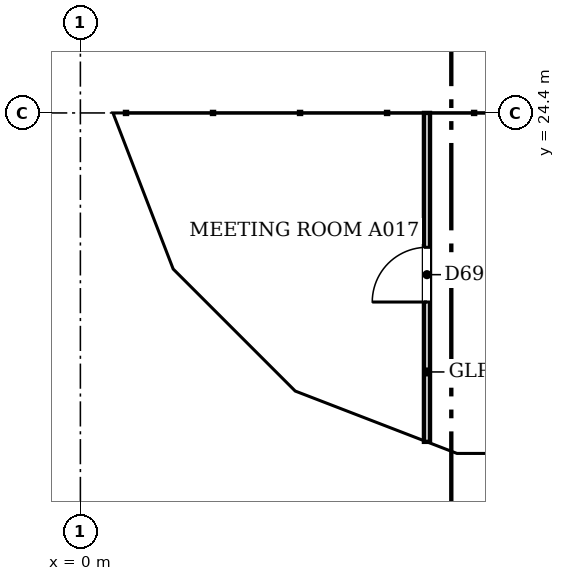
"""IFC4 building model, lengths in metres.
Left out: names, types, materials, properties, quantities, classifications, styles, units other than length and angle.
Written with IfcOpenShell. Run it as: python <this file> out.ifc"""

import sys

from ifc_helpers import new_model, si_unit, direction, frame, frame_2d, origin, place, context, subcontext, project, spatial, polyline, rectangle, outline, extrude, faceted_brep, source, transform, mapped, element, fill, save


model = new_model("IFC4")
c1 = context("Model", 3, precision=1e-05, world=origin(), true_north=direction((0.0, 1.0)))
c2 = subcontext(c1, "Body", "Model", "MODEL_VIEW")
j1 = project(units=[si_unit("LENGTHUNIT", "METRE"), si_unit("PLANEANGLEUNIT", "RADIAN")], contexts=[c1])
p1 = place(None, origin())
s1 = spatial("IfcSite", under=j1, at=p1, CompositionType="ELEMENT")
p2 = place(p1, origin())
s2 = spatial("IfcBuilding", under=s1, at=p2, CompositionType="ELEMENT")
p3 = place(p2, frame((0.0, 0.0, 135.4)))
s3 = spatial("IfcBuildingStorey", under=s2, at=p3, CompositionType="ELEMENT", Elevation=135.4)
m1 = source(origin(), c2, "Body", "Brep", [
    faceted_brep([(3.05, -0.25, 0.0), (6.053, -0.25, 3.8), (3.05, -0.25, 7.6), (0.0, -0.25, 3.8), (0.0, 0.25, 3.8), (3.05, 0.25, 7.6), (6.007, 0.25, 3.859), (6.007, 0.25, 3.741), (3.05, 0.25, 0.0), (6.053, 0.0, 3.8)], [[[0, 1, 2, 3]], [[4, 5, 6, 7, 8]], [[8, 7, 9, 1, 0]], [[6, 5, 2, 1, 9]], [[5, 4, 3, 2]], [[4, 8, 0, 3]], [[9, 7, 6]]]),
])
p4 = place(p3, frame((0.25, 30.5, -3.8), z_axis=(0.0, 0.0, 1.0), x_axis=(0.0, -1.0, 0.0)))
e1 = element("IfcWall", 1, at=p4, inside=s3, PredefinedType="SOLIDWALL", context=c2, shape_type="MappedRepresentation", body=[
    mapped(m1, transform((0.0, 0.0, 0.0), scale=1.0)),
])
m2 = source(origin(), c2, "Body", "SweptSolid", [
    extrude(outline(polyline([(3.049, 0.401), (5.735, 3.8), (3.049, 7.199), (0.321, 3.8), (3.049, 0.401)])), frame((0.0, 0.26, 0.0), z_axis=(0.0, -1.0, 0.0), x_axis=(1.0, 0.0, 0.0)), (0.0, 0.0, 1.0), 0.52),
])
p5 = place(p4, origin())
e2 = element("IfcOpeningElement", 2, at=p5, cuts=e1, PredefinedType="OPENING", context=c2, shape_type="MappedRepresentation", body=[
    mapped(m2, transform((0.0, 0.0, 0.0), scale=1.0)),
])
m3 = source(origin(), c2, "Body", "Brep", [
    faceted_brep([(2.95, -0.25, 0.0), (3.003, -0.25, 0.068), (3.003, -0.25, 7.531), (2.95, -0.25, 7.6), (0.0, -0.25, 3.8), (0.047, 0.25, 3.86), (2.898, 0.25, 7.532), (2.898, 0.25, 0.068), (0.047, 0.25, 3.74), (2.95, 0.0, 0.0), (2.95, 0.0, 7.6), (0.0, 0.0, 3.8)], [[[0, 1, 2, 3, 4]], [[5, 6, 7, 8]], [[1, 0, 9]], [[10, 3, 2]], [[6, 5, 11, 4, 3, 10]], [[8, 7, 9, 0, 4, 11]], [[8, 11, 5]], [[1, 9, 7, 6, 10, 2]]]),
])
p6 = place(p3, frame((0.25, 24.447, -3.8), z_axis=(0.0, 0.0, 1.0), x_axis=(0.35992665181, -0.932980602862, 0.0)))
e3 = element("IfcWall", 3, at=p6, inside=s3, PredefinedType="SOLIDWALL", context=c2, shape_type="MappedRepresentation", body=[
    mapped(m3, transform((0.0, 0.0, 0.0), scale=1.0)),
])
m4 = source(origin(), c2, "Body", "SweptSolid", [
    extrude(outline(polyline([(2.75, 6.935), (0.316, 3.8), (2.75, 0.665), (2.75, 6.935)])), frame((0.0, 0.26, 0.0), z_axis=(0.0, -1.0, 0.0), x_axis=(1.0, 0.0, 0.0)), (0.0, 0.0, 1.0), 0.52),
])
p7 = place(p6, origin())
e4 = element("IfcOpeningElement", 4, at=p7, cuts=e3, PredefinedType="OPENING", context=c2, shape_type="MappedRepresentation", body=[
    mapped(m4, transform((0.0, 0.0, 0.0), scale=1.0)),
])
m5 = source(origin(), c2, "Body", "Brep", [
    faceted_brep([(0.053, -0.25, 0.0), (2.997, -0.25, 3.8), (0.053, -0.25, 7.6), (0.0, -0.25, 7.532), (0.0, -0.25, 0.068), (0.106, 0.25, 7.531), (2.944, 0.25, 3.868), (2.944, 0.25, 3.732), (0.106, 0.25, 0.068), (2.997, 0.0, 3.8), (0.053, 0.0, 0.0), (0.053, 0.0, 7.6)], [[[0, 1, 2, 3, 4]], [[5, 6, 7, 8]], [[8, 7, 9, 1, 0, 10]], [[6, 5, 11, 2, 1, 9]], [[3, 2, 11]], [[10, 0, 4]], [[8, 10, 4, 3, 11, 5]], [[9, 7, 6]]]),
])
p8 = place(p3, frame((1.274, 21.731, -3.8), z_axis=(0.0, 0.0, 1.0), x_axis=(0.707147509625, -0.707066050402, 0.0)))
e5 = element("IfcWall", 5, at=p8, inside=s3, PredefinedType="SOLIDWALL", context=c2, shape_type="MappedRepresentation", body=[
    mapped(m5, transform((0.0, 0.0, 0.0), scale=1.0)),
])
m6 = source(origin(), c2, "Body", "SweptSolid", [
    extrude(outline(polyline([(0.253, 0.666), (2.681, 3.8), (0.253, 6.934), (0.253, 0.666)])), frame((0.0, 0.26, 0.0), z_axis=(0.0, -1.0, 0.0), x_axis=(1.0, 0.0, 0.0)), (0.0, 0.0, 1.0), 0.52),
])
p9 = place(p8, origin())
e6 = element("IfcOpeningElement", 6, at=p9, cuts=e5, PredefinedType="OPENING", context=c2, shape_type="MappedRepresentation", body=[
    mapped(m6, transform((0.0, 0.0, 0.0), scale=1.0)),
])
m7 = source(origin(), c2, "Body", "Brep", [
    faceted_brep([(2.95, -0.25, 0.0), (2.997, -0.25, 0.059), (2.997, -0.25, 7.541), (2.95, -0.25, 7.6), (0.0, -0.25, 3.8), (0.053, 0.25, 3.868), (2.904, 0.25, 7.54), (2.904, 0.25, 0.06), (0.053, 0.25, 3.732), (2.95, 0.0, 0.0), (2.95, 0.0, 7.6), (0.0, 0.0, 3.8)], [[[0, 1, 2, 3, 4]], [[5, 6, 7, 8]], [[1, 0, 9]], [[10, 3, 2]], [[6, 5, 11, 4, 3, 10]], [[8, 7, 9, 0, 4, 11]], [[8, 11, 5]], [[1, 9, 7, 6, 10, 2]]]),
])
p10 = place(p3, frame((3.394, 19.612, -3.8), z_axis=(0.0, 0.0, 1.0), x_axis=(0.932990326376, -0.359901446078, 0.0)))
e7 = element("IfcWall", 7, at=p10, inside=s3, PredefinedType="SOLIDWALL", context=c2, shape_type="MappedRepresentation", body=[
    mapped(m7, transform((0.0, 0.0, 0.0), scale=1.0)),
])
p11 = place(p10, origin())
e8 = element("IfcOpeningElement", 8, at=p11, cuts=e7, PredefinedType="OPENING", context=c2, shape_type="MappedRepresentation", body=[
    mapped(m4, transform((0.0, 0.0, 0.0), scale=1.0)),
])
m8 = source(origin(), c2, "Body", "Brep", [
    faceted_brep([(0.047, -0.25, 0.0), (3.05, -0.25, 3.8), (0.047, -0.25, 7.6), (0.0, -0.25, 7.54), (0.0, -0.25, 0.06), (0.093, 0.25, 7.541), (3.05, 0.25, 3.8), (0.093, 0.25, 0.059), (0.047, 0.0, 0.0), (0.047, 0.0, 7.6)], [[[0, 1, 2, 3, 4]], [[5, 6, 7]], [[7, 6, 1, 0, 8]], [[6, 5, 9, 2, 1]], [[3, 2, 9]], [[8, 0, 4]], [[7, 8, 4, 3, 9, 5]]]),
])
p12 = place(p3, frame((6.1, 18.55, -3.8), z_axis=(0.0, 0.0, 1.0), x_axis=(1.0, 0.0, 0.0)))
e9 = element("IfcWall", 9, at=p12, inside=s3, PredefinedType="SOLIDWALL", context=c2, shape_type="MappedRepresentation", body=[
    mapped(m8, transform((0.0, 0.0, 0.0), scale=1.0)),
])
m9 = source(origin(), c2, "Body", "SweptSolid", [
    extrude(outline(polyline([(0.247, 0.656), (2.731, 3.8), (0.247, 6.944), (0.247, 0.656)])), frame((0.0, 0.26, 0.0), z_axis=(0.0, -1.0, 0.0), x_axis=(1.0, 0.0, 0.0)), (0.0, 0.0, 1.0), 0.52),
])
p13 = place(p12, origin())
e10 = element("IfcOpeningElement", 10, at=p13, cuts=e9, PredefinedType="OPENING", context=c2, shape_type="MappedRepresentation", body=[
    mapped(m9, transform((0.0, 0.0, 0.0), scale=1.0)),
])
p14 = place(p2, frame((0.0, 0.0, 139.2)))
s4 = spatial("IfcBuildingStorey", under=s2, at=p14, CompositionType="ELEMENT", Elevation=139.2)
m10 = source(origin(), c2, "Body", "Brep", [
    faceted_brep([(3.003, -0.25, 0.0), (3.05, -0.25, 0.06), (3.05, -0.25, 7.54), (3.003, -0.25, 7.6), (0.0, -0.25, 3.8), (0.0, 0.25, 3.8), (2.957, 0.25, 7.541), (2.957, 0.25, 0.059), (3.003, 0.0, 0.0), (3.003, 0.0, 7.6)], [[[0, 1, 2, 3, 4]], [[5, 6, 7]], [[1, 0, 8]], [[9, 3, 2]], [[6, 5, 4, 3, 9]], [[5, 7, 8, 0, 4]], [[1, 8, 7, 6, 9, 2]]]),
])
p15 = place(p14, frame((0.25, 27.45, -3.8), z_axis=(0.0, 0.0, 1.0), x_axis=(0.0, -1.0, 0.0)))
e11 = element("IfcWall", 11, at=p15, inside=s4, PredefinedType="SOLIDWALL", context=c2, shape_type="MappedRepresentation", body=[
    mapped(m10, transform((0.0, 0.0, 0.0), scale=1.0)),
])
m11 = source(origin(), c2, "Body", "SweptSolid", [
    extrude(outline(polyline([(2.803, 6.944), (0.319, 3.8), (2.803, 0.656), (2.803, 6.944)])), frame((0.0, 0.26, 0.0), z_axis=(0.0, -1.0, 0.0), x_axis=(1.0, 0.0, 0.0)), (0.0, 0.0, 1.0), 0.52),
])
p16 = place(p15, origin())
e12 = element("IfcOpeningElement", 12, at=p16, cuts=e11, PredefinedType="OPENING", context=c2, shape_type="MappedRepresentation", body=[
    mapped(m11, transform((0.0, 0.0, 0.0), scale=1.0)),
])
m12 = source(origin(), c2, "Body", "Brep", [
    faceted_brep([(0.047, -0.25, 0.0), (2.997, -0.25, 3.8), (0.047, -0.25, 7.6), (0.0, -0.25, 7.541), (0.0, -0.25, 0.059), (0.093, 0.25, 7.54), (2.944, 0.25, 3.868), (2.944, 0.25, 3.732), (0.093, 0.25, 0.06), (2.997, 0.0, 3.8), (0.047, 0.0, 0.0), (0.047, 0.0, 7.6)], [[[0, 1, 2, 3, 4]], [[5, 6, 7, 8]], [[8, 7, 9, 1, 0, 10]], [[6, 5, 11, 2, 1, 9]], [[3, 2, 11]], [[10, 0, 4]], [[8, 10, 4, 3, 11, 5]], [[9, 7, 6]]]),
])
p17 = place(p14, frame((0.233, 24.49, -3.8), z_axis=(0.0, 0.0, 1.0), x_axis=(0.359901446078, -0.932990326376, 0.0)))
e13 = element("IfcWall", 13, at=p17, inside=s4, PredefinedType="SOLIDWALL", context=c2, shape_type="MappedRepresentation", body=[
    mapped(m12, transform((0.0, 0.0, 0.0), scale=1.0)),
])
m13 = source(origin(), c2, "Body", "SweptSolid", [
    extrude(outline(polyline([(0.247, 0.665), (2.681, 3.8), (0.247, 6.935), (0.247, 0.665)])), frame((0.0, 0.26, 0.0), z_axis=(0.0, -1.0, 0.0), x_axis=(1.0, 0.0, 0.0)), (0.0, 0.0, 1.0), 0.52),
])
p18 = place(p17, origin())
e14 = element("IfcOpeningElement", 14, at=p18, cuts=e13, PredefinedType="OPENING", context=c2, shape_type="MappedRepresentation", body=[
    mapped(m13, transform((0.0, 0.0, 0.0), scale=1.0)),
])
m14 = source(origin(), c2, "Body", "Brep", [
    faceted_brep([(2.944, -0.25, 0.0), (2.997, -0.25, 0.068), (2.997, -0.25, 7.532), (2.944, -0.25, 7.6), (0.0, -0.25, 3.8), (0.053, 0.25, 3.868), (2.891, 0.25, 7.532), (2.891, 0.25, 0.068), (0.053, 0.25, 3.732), (2.944, 0.0, 0.0), (2.944, 0.0, 7.6), (0.0, 0.0, 3.8)], [[[0, 1, 2, 3, 4]], [[5, 6, 7, 8]], [[1, 0, 9]], [[10, 3, 2]], [[6, 5, 11, 4, 3, 10]], [[8, 7, 9, 0, 4, 11]], [[8, 11, 5]], [[1, 9, 7, 6, 10, 2]]]),
])
p19 = place(p14, frame((1.312, 21.694, -3.8), z_axis=(0.0, 0.0, 1.0), x_axis=(0.707066050402, -0.707147509625, 0.0)))
e15 = element("IfcWall", 15, at=p19, inside=s4, PredefinedType="SOLIDWALL", context=c2, shape_type="MappedRepresentation", body=[
    mapped(m14, transform((0.0, 0.0, 0.0), scale=1.0)),
])
m15 = source(origin(), c2, "Body", "SweptSolid", [
    extrude(outline(polyline([(2.744, 6.934), (0.316, 3.8), (2.744, 0.667), (2.744, 6.934)])), frame((0.0, 0.26, 0.0), z_axis=(0.0, -1.0, 0.0), x_axis=(1.0, 0.0, 0.0)), (0.0, 0.0, 1.0), 0.52),
])
p20 = place(p19, origin())
e16 = element("IfcOpeningElement", 16, at=p20, cuts=e15, PredefinedType="OPENING", context=c2, shape_type="MappedRepresentation", body=[
    mapped(m15, transform((0.0, 0.0, 0.0), scale=1.0)),
])
m16 = source(origin(), c2, "Body", "Brep", [
    faceted_brep([(0.053, -0.25, 0.0), (3.003, -0.25, 3.8), (0.053, -0.25, 7.6), (0.0, -0.25, 7.532), (0.0, -0.25, 0.068), (0.106, 0.25, 7.532), (2.957, 0.25, 3.86), (2.957, 0.25, 3.74), (0.106, 0.25, 0.068), (3.003, 0.0, 3.8), (0.053, 0.0, 0.0), (0.053, 0.0, 7.6)], [[[0, 1, 2, 3, 4]], [[5, 6, 7, 8]], [[8, 7, 9, 1, 0, 10]], [[6, 5, 11, 2, 1, 9]], [[3, 2, 11]], [[10, 0, 4]], [[8, 10, 4, 3, 11, 5]], [[9, 7, 6]]]),
])
p21 = place(p14, frame((3.344, 19.631, -3.8), z_axis=(0.0, 0.0, 1.0), x_axis=(0.933007896601, -0.359855894603, 0.0)))
e17 = element("IfcWall", 17, at=p21, inside=s4, PredefinedType="SOLIDWALL", context=c2, shape_type="MappedRepresentation", body=[
    mapped(m16, transform((0.0, 0.0, 0.0), scale=1.0)),
])
m17 = source(origin(), c2, "Body", "SweptSolid", [
    extrude(outline(polyline([(0.253, 0.665), (2.687, 3.8), (0.253, 6.935), (0.253, 0.665)])), frame((0.0, 0.26, 0.0), z_axis=(0.0, -1.0, 0.0), x_axis=(1.0, 0.0, 0.0)), (0.0, 0.0, 1.0), 0.52),
])
p22 = place(p21, origin())
e18 = element("IfcOpeningElement", 18, at=p22, cuts=e17, PredefinedType="OPENING", context=c2, shape_type="MappedRepresentation", body=[
    mapped(m17, transform((0.0, 0.0, 0.0), scale=1.0)),
])
m18 = source(origin(), c2, "Body", "Brep", [
    faceted_brep([(3.003, -0.25, 0.0), (6.053, -0.25, 3.8), (3.003, -0.25, 7.6), (0.0, -0.25, 3.8), (0.047, 0.25, 3.859), (3.003, 0.25, 7.6), (6.053, 0.25, 3.8), (3.003, 0.25, 0.0), (0.047, 0.25, 3.741), (0.0, 0.0, 3.8)], [[[0, 1, 2, 3]], [[4, 5, 6, 7, 8]], [[7, 6, 1, 0]], [[6, 5, 2, 1]], [[5, 4, 9, 3, 2]], [[8, 7, 0, 3, 9]], [[8, 9, 4]]]),
])
p23 = place(p14, frame((6.146, 18.55, -3.8), z_axis=(0.0, 0.0, 1.0), x_axis=(1.0, 0.0, 0.0)))
e19 = element("IfcWall", 19, at=p23, inside=s4, PredefinedType="SOLIDWALL", context=c2, shape_type="MappedRepresentation", body=[
    mapped(m18, transform((0.0, 0.0, 0.0), scale=1.0)),
])
m19 = source(origin(), c2, "Body", "SweptSolid", [
    extrude(outline(polyline([(3.005, 0.401), (5.733, 3.8), (3.005, 7.199), (0.319, 3.8), (3.005, 0.401)])), frame((0.0, 0.26, 0.0), z_axis=(0.0, -1.0, 0.0), x_axis=(1.0, 0.0, 0.0)), (0.0, 0.0, 1.0), 0.52),
])
p24 = place(p23, origin())
e20 = element("IfcOpeningElement", 20, at=p24, cuts=e19, PredefinedType="OPENING", context=c2, shape_type="MappedRepresentation", body=[
    mapped(m19, transform((0.0, 0.0, 0.0), scale=1.0)),
])
p25 = place(p3, frame((5.7, 18.99, 0.0), z_axis=(0.0, 0.0, 1.0), x_axis=(0.0, 1.0, 0.0)))
e21 = element("IfcWall", 21, at=p25, inside=s3, PredefinedType="PARTITIONING", context=c2, shape_type="SweptSolid", body=[
    extrude(rectangle(XDim=5.41, YDim=0.1, at=frame_2d((2.705, 0.0))), origin(), (0.0, 0.0, 1.0), 3.067),
])
m20 = source(origin(), c2, "Body", "SweptSolid", [
    extrude(rectangle(XDim=0.9, YDim=2.1, at=frame_2d((0.45, 1.05))), frame((0.0, 0.06, 0.0), z_axis=(0.0, -1.0, 0.0), x_axis=(1.0, 0.0, 0.0)), (0.0, 0.0, 1.0), 0.12),
])
p26 = place(p25, frame((2.3, 0.0, 0.0)))
e22 = element("IfcOpeningElement", 22, at=p26, cuts=e21, PredefinedType="OPENING", context=c2, shape_type="MappedRepresentation", body=[
    mapped(m20, transform((0.0, 0.0, 0.0), scale=1.0)),
])
m21 = source(origin(), c2, "Body", "SweptSolid", [
    extrude(rectangle(XDim=0.9, YDim=2.1, at=frame_2d((0.45, 1.05))), frame((0.0, 0.025, 0.0), z_axis=(0.0, -1.0, 0.0), x_axis=(1.0, 0.0, 0.0)), (0.0, 0.0, 1.0), 0.05),
])
p27 = place(p26, origin())
e23 = element("IfcDoor", 23, at=p27, inside=s3, OperationType="SINGLE_SWING_LEFT", PredefinedType="DOOR", context=c2, shape_type="MappedRepresentation", body=[
    mapped(m21, transform((0.0, 0.0, 0.0), scale=1.0)),
])
fill(e22, e23)
save(model, sys.argv[1])
